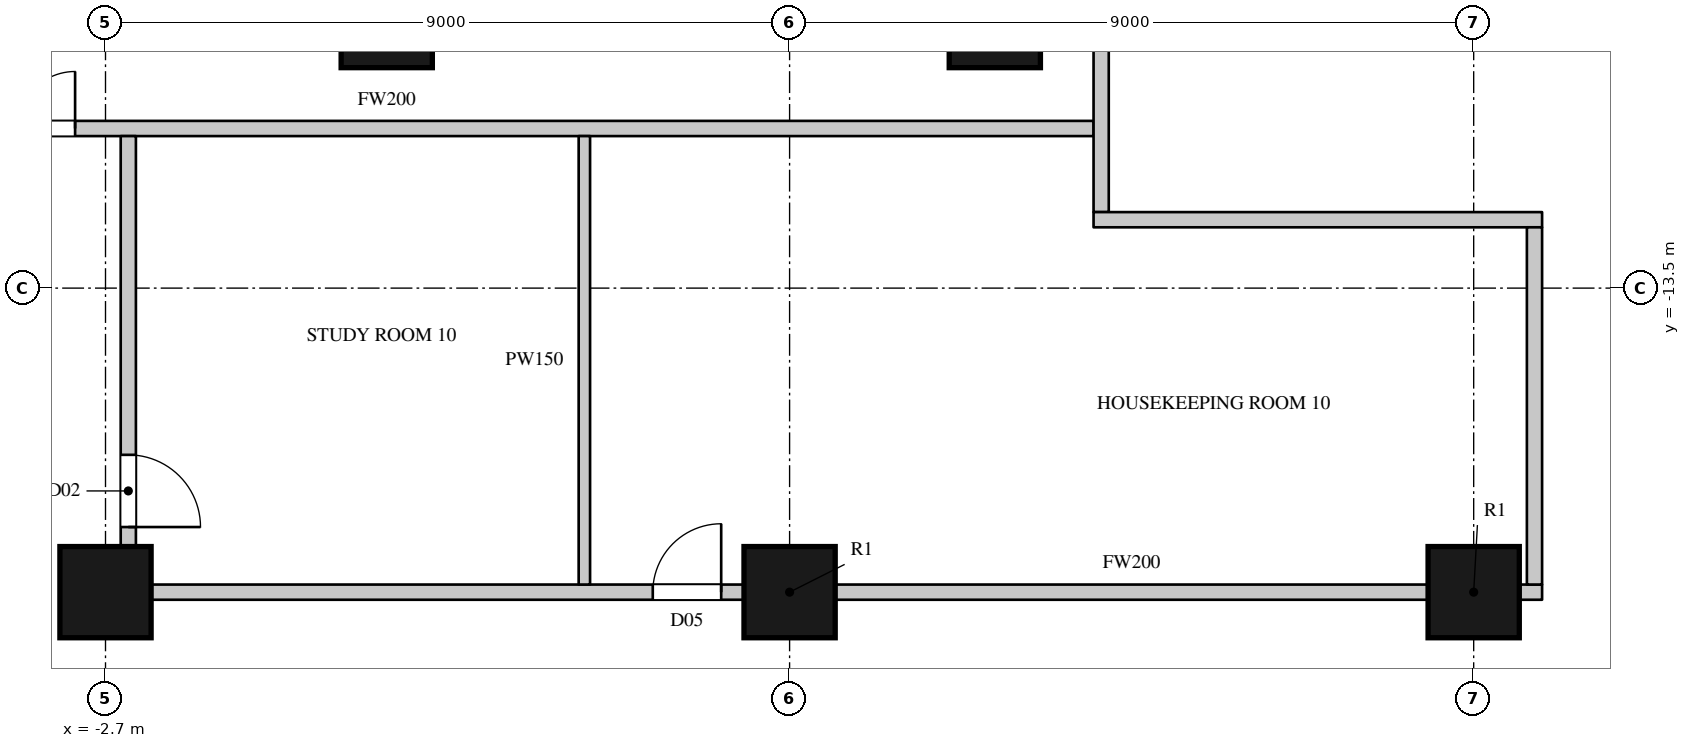
"""IFC4 building model, lengths in metres.
Left out: names, types, materials, properties, quantities, classifications, styles, units other than length and angle.
Written with IfcOpenShell. Run it as: python <this file> out.ifc"""

import sys

from ifc_helpers import new_model, si_unit, direction, frame, frame_2d, origin, origin_2d, place, context, subcontext, project, spatial, rectangle, circle, extrude, element, fill, save


model = new_model("IFC4")
c1 = context("Model", 3, precision=1e-05, world=origin(), true_north=direction((0.0, 1.0)))
c2 = subcontext(c1, "Body", "Model", "MODEL_VIEW")
j1 = project(units=[si_unit("LENGTHUNIT", "METRE"), si_unit("PLANEANGLEUNIT", "RADIAN")], contexts=[c1])
p1 = place(None, origin())
s1 = spatial("IfcSite", under=j1, at=p1, CompositionType="ELEMENT")
p2 = place(p1, origin())
s2 = spatial("IfcBuilding", under=s1, at=p2, CompositionType="ELEMENT")
p3 = place(p2, frame((0.0, 0.0, 66.3)))
s3 = spatial("IfcBuildingStorey", under=s2, at=p3, CompositionType="ELEMENT", Elevation=66.3)
for number, where, z_axis, x_axis in (
    (1, (-2.7, -17.5, 0.0), (0.0, 0.0, 1.0), (1.0, 0.0, 0.0)),
    (2, (6.3, -17.5, 0.0), (0.0, 0.0, 1.0), (1.0, 0.0, 0.0)),
    (3, (15.3, -17.5, 0.0), (0.0, 0.0, 1.0), (1.0, 0.0, 0.0)),
    (4, (1.0, -10.0, 0.0), (0.0, 0.0, 1.0), (1.0, 0.0, 0.0)),
    (5, (9.0, -10.0, 0.0), (0.0, 0.0, 1.0), (1.0, 0.0, 0.0)),
):
    element("IfcColumn", number, at=place(p3, frame(where, z_axis=z_axis, x_axis=x_axis)), inside=s3, PredefinedType="COLUMN", context=c2, shape_type="SweptSolid", body=[
        extrude(circle(Radius=0.6, at=origin_2d()), origin(), (0.0, 0.0, 1.0), 3.6),
    ])
p4 = place(p3, frame((-8.3, -11.4, 0.0), z_axis=(0.0, 0.0, 1.0), x_axis=(1.0, 0.0, 0.0)))
e6 = element("IfcWall", 6, at=p4, inside=s3, PredefinedType="PARTITIONING", context=c2, shape_type="SweptSolid", body=[
    extrude(rectangle(XDim=18.6, YDim=0.2, at=frame_2d((9.3, 0.0))), origin(), (0.0, 0.0, 1.0), 3.3),
])
p5 = place(p4, frame((3.7, 0.0, 0.0)))
e7 = element("IfcOpeningElement", 7, at=p5, cuts=e6, PredefinedType="OPENING", context=c2, shape_type="SweptSolid", body=[
    extrude(rectangle(XDim=1.5, YDim=2.2, at=frame_2d((0.75, 1.1))), frame((0.0, 0.11, 0.0), z_axis=(0.0, -1.0, 0.0), x_axis=(1.0, 0.0, 0.0)), (0.0, 0.0, 1.0), 0.22),
])
p6 = place(p3, frame((-2.4, -16.943, 0.0), z_axis=(0.0, 0.0, 1.0), x_axis=(0.0, 1.0, 0.0)))
e8 = element("IfcWall", 8, at=p6, inside=s3, PredefinedType="PARTITIONING", context=c2, shape_type="SweptSolid", body=[
    extrude(rectangle(XDim=5.443, YDim=0.2, at=frame_2d((2.722, 0.0))), origin(), (0.0, 0.0, 1.0), 3.3),
])
p7 = place(p6, frame((0.3, 0.0, 0.0)))
e9 = element("IfcOpeningElement", 9, at=p7, cuts=e8, PredefinedType="OPENING", context=c2, shape_type="SweptSolid", body=[
    extrude(rectangle(XDim=0.95, YDim=2.2, at=frame_2d((0.475, 1.1))), frame((0.0, 0.11, 0.0), z_axis=(0.0, -1.0, 0.0), x_axis=(1.0, 0.0, 0.0)), (0.0, 0.0, 1.0), 0.22),
])
p8 = place(p3, frame((-2.1, -17.5, 0.0), z_axis=(0.0, 0.0, 1.0), x_axis=(1.0, 0.0, 0.0)))
e10 = element("IfcWall", 10, at=p8, inside=s3, PredefinedType="PARTITIONING", context=c2, shape_type="SweptSolid", body=[
    extrude(rectangle(XDim=7.8, YDim=0.2, at=frame_2d((3.9, 0.0))), origin(), (0.0, 0.0, 1.0), 2.75),
])
p9 = place(p8, frame((6.6, 0.0, 0.0)))
e11 = element("IfcOpeningElement", 11, at=p9, cuts=e10, PredefinedType="OPENING", context=c2, shape_type="SweptSolid", body=[
    extrude(rectangle(XDim=0.9, YDim=2.2, at=frame_2d((0.45, 1.1))), frame((0.0, 0.11, 0.0), z_axis=(0.0, -1.0, 0.0), x_axis=(1.0, 0.0, 0.0)), (0.0, 0.0, 1.0), 0.22),
])
p10 = place(p3, frame((6.9, -17.5, 0.0), z_axis=(0.0, 0.0, 1.0), x_axis=(1.0, 0.0, 0.0)))
e12 = element("IfcWall", 12, at=p10, inside=s3, PredefinedType="PARTITIONING", context=c2, shape_type="SweptSolid", body=[
    extrude(rectangle(XDim=7.8, YDim=0.2, at=frame_2d((3.9, 0.0))), origin(), (0.0, 0.0, 1.0), 2.75),
])
p11 = place(p3, frame((15.9, -17.5, 0.0), z_axis=(0.0, 0.0, 1.0), x_axis=(1.0, 0.0, 0.0)))
e13 = element("IfcWall", 13, at=p11, inside=s3, PredefinedType="PARTITIONING", context=c2, shape_type="SweptSolid", body=[
    extrude(rectangle(XDim=0.3, YDim=0.2, at=frame_2d((0.15, 0.0))), origin(), (0.0, 0.0, 1.0), 3.3),
])
p12 = place(p3, frame((10.399, -12.5, 0.0), z_axis=(0.0, 0.0, 1.0), x_axis=(0.0, 1.0, 0.0)))
e14 = element("IfcWall", 14, at=p12, inside=s3, PredefinedType="PARTITIONING", context=c2, shape_type="SweptSolid", body=[
    extrude(rectangle(XDim=23.8, YDim=0.2, at=frame_2d((11.9, 0.0))), origin(), (0.0, 0.0, 1.0), 3.3),
])
p13 = place(p12, frame((6.0, 0.0, 0.0)))
e15 = element("IfcOpeningElement", 15, at=p13, cuts=e14, PredefinedType="OPENING", context=c2, shape_type="SweptSolid", body=[
    extrude(rectangle(XDim=1.5, YDim=2.2, at=frame_2d((0.75, 1.1))), frame((0.0, 0.11, 0.0), z_axis=(0.0, -1.0, 0.0), x_axis=(1.0, 0.0, 0.0)), (0.0, 0.0, 1.0), 0.22),
])
p14 = place(p12, frame((17.5, 0.0, 0.0)))
e16 = element("IfcOpeningElement", 16, at=p14, cuts=e14, PredefinedType="OPENING", context=c2, shape_type="SweptSolid", body=[
    extrude(rectangle(XDim=1.5, YDim=2.2, at=frame_2d((0.75, 1.1))), frame((0.0, 0.11, 0.0), z_axis=(0.0, -1.0, 0.0), x_axis=(1.0, 0.0, 0.0)), (0.0, 0.0, 1.0), 0.22),
])
p15 = place(p12, frame((7.7, 0.0, 0.0)))
e17 = element("IfcOpeningElement", 17, at=p15, cuts=e14, PredefinedType="OPENING", context=c2, shape_type="SweptSolid", body=[
    extrude(rectangle(XDim=1.5, YDim=2.2, at=frame_2d((0.75, 1.1))), frame((0.0, 0.11, 0.0), z_axis=(0.0, -1.0, 0.0), x_axis=(1.0, 0.0, 0.0)), (0.0, 0.0, 1.0), 0.22),
])
p16 = place(p12, frame((13.15, 0.0, 0.0)))
e18 = element("IfcOpeningElement", 18, at=p16, cuts=e14, PredefinedType="OPENING", context=c2, shape_type="SweptSolid", body=[
    extrude(rectangle(XDim=1.5, YDim=2.2, at=frame_2d((0.75, 1.1))), frame((0.0, 0.11, 0.0), z_axis=(0.0, -1.0, 0.0), x_axis=(1.0, 0.0, 0.0)), (0.0, 0.0, 1.0), 0.22),
])
p17 = place(p3, frame((10.299, -12.6, 0.0), z_axis=(0.0, 0.0, 1.0), x_axis=(1.0, 0.0, 0.0)))
e19 = element("IfcWall", 19, at=p17, inside=s3, PredefinedType="PARTITIONING", context=c2, shape_type="SweptSolid", body=[
    extrude(rectangle(XDim=5.901, YDim=0.2, at=frame_2d((2.95, 0.0))), origin(), (0.0, 0.0, 1.0), 3.3),
])
p18 = place(p3, frame((16.1, -17.4, 0.0), z_axis=(0.0, 0.0, 1.0), x_axis=(0.0, 1.0, 0.0)))
e20 = element("IfcWall", 20, at=p18, inside=s3, PredefinedType="PARTITIONING", context=c2, shape_type="SweptSolid", body=[
    extrude(rectangle(XDim=4.7, YDim=0.2, at=frame_2d((2.35, 0.0))), origin(), (0.0, 0.0, 1.0), 3.3),
])
p19 = place(p3, frame((3.6, -17.4, 0.0), z_axis=(0.0, 0.0, 1.0), x_axis=(0.0, 1.0, 0.0)))
e21 = element("IfcWall", 21, at=p19, inside=s3, PredefinedType="PARTITIONING", context=c2, shape_type="SweptSolid", body=[
    extrude(rectangle(XDim=5.9, YDim=0.15, at=frame_2d((2.95, 0.0))), origin(), (0.0, 0.0, 1.0), 3.3),
])
p20 = place(p5, origin())
e22 = element("IfcDoor", 22, at=p20, inside=s3, OperationType="DOUBLE_DOOR_SINGLE_SWING", PredefinedType="DOOR", context=c2, shape_type="SweptSolid", body=[
    extrude(rectangle(XDim=1.5, YDim=2.2, at=frame_2d((0.75, 1.1))), frame((0.0, 0.025, 0.0), z_axis=(0.0, -1.0, 0.0), x_axis=(1.0, 0.0, 0.0)), (0.0, 0.0, 1.0), 0.05),
])
fill(e7, e22)
p21 = place(p7, origin())
e23 = element("IfcDoor", 23, at=p21, inside=s3, OperationType="SINGLE_SWING_RIGHT", PredefinedType="DOOR", context=c2, shape_type="SweptSolid", body=[
    extrude(rectangle(XDim=0.95, YDim=2.2, at=frame_2d((0.475, 1.1))), frame((0.0, 0.025, 0.0), z_axis=(0.0, -1.0, 0.0), x_axis=(1.0, 0.0, 0.0)), (0.0, 0.0, 1.0), 0.05),
])
fill(e9, e23)
p22 = place(p9, origin())
e24 = element("IfcDoor", 24, at=p22, inside=s3, OperationType="SINGLE_SWING_RIGHT", PredefinedType="DOOR", context=c2, shape_type="SweptSolid", body=[
    extrude(rectangle(XDim=0.9, YDim=2.2, at=frame_2d((0.45, 1.1))), frame((0.0, 0.025, 0.0), z_axis=(0.0, -1.0, 0.0), x_axis=(1.0, 0.0, 0.0)), (0.0, 0.0, 1.0), 0.05),
])
fill(e11, e24)
save(model, sys.argv[1])
